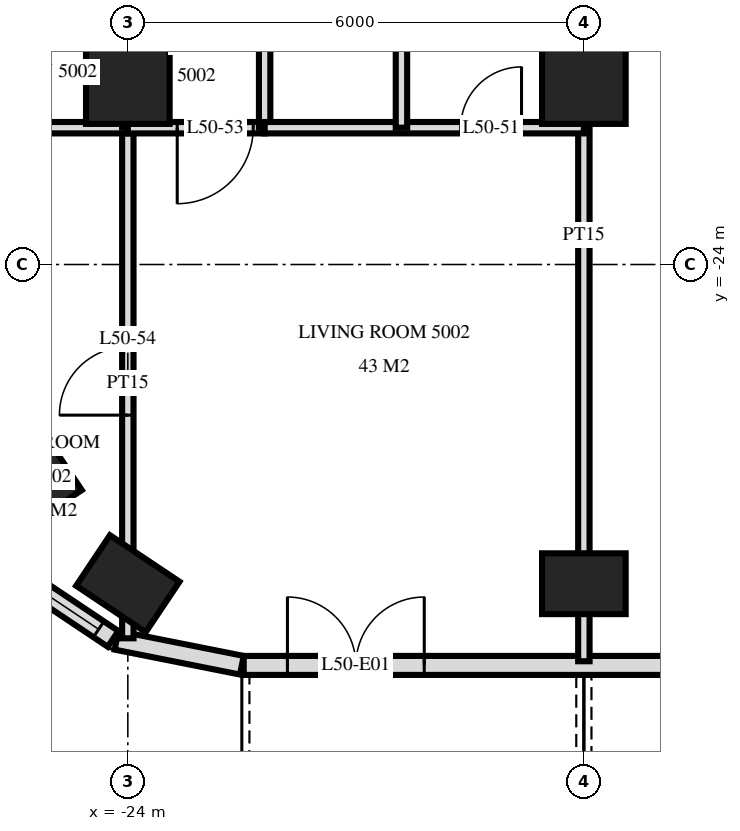
"""IFC4 building model, lengths in metres.
Left out: names, types, materials, properties, quantities, classifications, styles, units other than length and angle.
Written with IfcOpenShell. Run it as: python <this file> out.ifc"""

import sys

from ifc_helpers import new_model, si_unit, direction, frame, frame_2d, origin, origin_2d, place, context, subcontext, project, spatial, rectangle, extrude, element, fill, save


model = new_model("IFC4")
c1 = context("Model", 3, precision=1e-05, world=origin(), true_north=direction((0.0, 1.0)))
c2 = subcontext(c1, "Body", "Model", "MODEL_VIEW")
j1 = project(units=[si_unit("LENGTHUNIT", "METRE"), si_unit("PLANEANGLEUNIT", "RADIAN")], contexts=[c1])
p1 = place(None, origin())
s1 = spatial("IfcSite", under=j1, at=p1, CompositionType="ELEMENT")
p2 = place(p1, origin())
s2 = spatial("IfcBuilding", under=s1, at=p2, CompositionType="ELEMENT")
p3 = place(p2, frame((0.0, 0.0, 194.1)))
s3 = spatial("IfcBuildingStorey", under=s2, at=p3, CompositionType="ELEMENT", Elevation=194.1)
for number, where, z_axis, x_axis in (
    (1, (-25.244, -26.733, 0.0), (0.0, 0.0, 1.0), (-0.556, 0.831, 0.0)),
    (2, (-24.0, -28.2, 0.0), (0.0, 0.0, 1.0), (-0.831, 0.556, 0.0)),
):
    element("IfcColumn", number, at=place(p3, frame(where, z_axis=z_axis, x_axis=x_axis)), inside=s3, PredefinedType="COLUMN", context=c2, shape_type="SweptSolid", body=[
        extrude(rectangle(XDim=1.1, YDim=0.8, at=origin_2d()), origin(), (0.0, 0.0, 1.0), 3.5),
    ])
p4 = place(p3, frame((-24.0, -21.6, 0.0), z_axis=(0.0, 0.0, 1.0), x_axis=(1.0, 0.0, 0.0)))
e3 = element("IfcColumn", 3, at=p4, inside=s3, PredefinedType="COLUMN", context=c2, shape_type="SweptSolid", body=[
    extrude(rectangle(XDim=1.1, YDim=1.1, at=origin_2d()), origin(), (0.0, 0.0, 1.0), 3.5),
])
p5 = place(p3, frame((-18.0, -28.2, 0.0), z_axis=(0.0, 0.0, 1.0), x_axis=(1.0, 0.0, 0.0)))
e4 = element("IfcColumn", 4, at=p5, inside=s3, PredefinedType="COLUMN", context=c2, shape_type="SweptSolid", body=[
    extrude(rectangle(XDim=1.1, YDim=0.8, at=origin_2d()), origin(), (0.0, 0.0, 1.0), 3.5),
])
p6 = place(p3, frame((-18.0, -21.6, 0.0), z_axis=(0.0, 0.0, 1.0), x_axis=(1.0, 0.0, 0.0)))
e5 = element("IfcColumn", 5, at=p6, inside=s3, PredefinedType="COLUMN", context=c2, shape_type="SweptSolid", body=[
    extrude(rectangle(XDim=1.1, YDim=1.1, at=origin_2d()), origin(), (0.0, 0.0, 1.0), 3.5),
])
p7 = place(p3, frame((-25.571, -28.006, 0.0), z_axis=(0.0, 0.0, 1.0), x_axis=(0.831482937015, -0.55555029066, 0.0)))
e6 = element("IfcWall", 6, at=p7, inside=s3, PredefinedType="SOLIDWALL", context=c2, shape_type="SweptSolid", body=[
    extrude(rectangle(XDim=1.656, YDim=0.25, at=frame_2d((0.828, 0.0))), origin(), (0.0, 0.0, 1.0), 3.22),
])
p8 = place(p7, frame((0.228, 0.0, 0.9)))
e7 = element("IfcOpeningElement", 7, at=p8, cuts=e6, PredefinedType="OPENING", context=c2, shape_type="SweptSolid", body=[
    extrude(rectangle(XDim=1.2, YDim=1.5, at=frame_2d((0.6, 0.75))), frame((0.0, 0.135, 0.0), z_axis=(0.0, -1.0, 0.0), x_axis=(1.0, 0.0, 0.0)), (0.0, 0.0, 1.0), 0.27),
])
p9 = place(p3, frame((-24.149, -28.945, 0.0), z_axis=(0.0, 0.0, 1.0), x_axis=(0.980775640221, -0.19513878023, 0.0)))
e8 = element("IfcWall", 8, at=p9, inside=s3, PredefinedType="SOLIDWALL", context=c2, shape_type="SweptSolid", body=[
    extrude(rectangle(XDim=1.681, YDim=0.25, at=frame_2d((0.841, 0.0))), origin(), (0.0, 0.0, 1.0), 3.22),
])
p10 = place(p3, frame((-22.475, -29.275, 0.0), z_axis=(0.0, 0.0, 1.0), x_axis=(1.0, 0.0, 0.0)))
e9 = element("IfcWall", 9, at=p10, inside=s3, PredefinedType="SOLIDWALL", context=c2, shape_type="SweptSolid", body=[
    extrude(rectangle(XDim=44.951, YDim=0.25, at=frame_2d((22.475, 0.0))), origin(), (0.0, 0.0, 1.0), 3.22),
])
p11 = place(p10, frame((0.575, 0.0, 0.0)))
e10 = element("IfcOpeningElement", 10, at=p11, cuts=e9, PredefinedType="OPENING", context=c2, shape_type="SweptSolid", body=[
    extrude(rectangle(XDim=1.8, YDim=2.4, at=frame_2d((0.9, 1.2))), frame((0.0, 0.135, 0.0), z_axis=(0.0, -1.0, 0.0), x_axis=(1.0, 0.0, 0.0)), (0.0, 0.0, 1.0), 0.27),
])
p12 = place(p10, frame((6.575, 0.0, 0.0)))
e11 = element("IfcOpeningElement", 11, at=p12, cuts=e9, PredefinedType="OPENING", context=c2, shape_type="SweptSolid", body=[
    extrude(rectangle(XDim=1.8, YDim=2.4, at=frame_2d((0.9, 1.2))), frame((0.0, 0.135, 0.0), z_axis=(0.0, -1.0, 0.0), x_axis=(1.0, 0.0, 0.0)), (0.0, 0.0, 1.0), 0.27),
])
p13 = place(p10, frame((11.075, 0.0, 0.0)))
e12 = element("IfcOpeningElement", 12, at=p13, cuts=e9, PredefinedType="OPENING", context=c2, shape_type="SweptSolid", body=[
    extrude(rectangle(XDim=1.8, YDim=2.4, at=frame_2d((0.9, 1.2))), frame((0.0, 0.135, 0.0), z_axis=(0.0, -1.0, 0.0), x_axis=(1.0, 0.0, 0.0)), (0.0, 0.0, 1.0), 0.27),
])
p14 = place(p10, frame((13.775, 0.0, 0.9)))
e13 = element("IfcOpeningElement", 13, at=p14, cuts=e9, PredefinedType="OPENING", context=c2, shape_type="SweptSolid", body=[
    extrude(rectangle(XDim=2.4, YDim=1.5, at=frame_2d((1.2, 0.75))), frame((0.0, 0.135, 0.0), z_axis=(0.0, -1.0, 0.0), x_axis=(1.0, 0.0, 0.0)), (0.0, 0.0, 1.0), 0.27),
])
p15 = place(p10, frame((16.775, 0.0, 0.9)))
e14 = element("IfcOpeningElement", 14, at=p15, cuts=e9, PredefinedType="OPENING", context=c2, shape_type="SweptSolid", body=[
    extrude(rectangle(XDim=2.4, YDim=1.5, at=frame_2d((1.2, 0.75))), frame((0.0, 0.135, 0.0), z_axis=(0.0, -1.0, 0.0), x_axis=(1.0, 0.0, 0.0)), (0.0, 0.0, 1.0), 0.27),
])
p16 = place(p10, frame((20.075, 0.0, 0.0)))
e15 = element("IfcOpeningElement", 15, at=p16, cuts=e9, PredefinedType="OPENING", context=c2, shape_type="SweptSolid", body=[
    extrude(rectangle(XDim=1.8, YDim=2.4, at=frame_2d((0.9, 1.2))), frame((0.0, 0.135, 0.0), z_axis=(0.0, -1.0, 0.0), x_axis=(1.0, 0.0, 0.0)), (0.0, 0.0, 1.0), 0.27),
])
p17 = place(p10, frame((23.075, 0.0, 0.0)))
e16 = element("IfcOpeningElement", 16, at=p17, cuts=e9, PredefinedType="OPENING", context=c2, shape_type="SweptSolid", body=[
    extrude(rectangle(XDim=1.8, YDim=2.4, at=frame_2d((0.9, 1.2))), frame((0.0, 0.135, 0.0), z_axis=(0.0, -1.0, 0.0), x_axis=(1.0, 0.0, 0.0)), (0.0, 0.0, 1.0), 0.27),
])
p18 = place(p10, frame((25.775, 0.0, 0.9)))
e17 = element("IfcOpeningElement", 17, at=p18, cuts=e9, PredefinedType="OPENING", context=c2, shape_type="SweptSolid", body=[
    extrude(rectangle(XDim=2.4, YDim=1.5, at=frame_2d((1.2, 0.75))), frame((0.0, 0.135, 0.0), z_axis=(0.0, -1.0, 0.0), x_axis=(1.0, 0.0, 0.0)), (0.0, 0.0, 1.0), 0.27),
])
p19 = place(p10, frame((29.075, 0.0, 0.0)))
e18 = element("IfcOpeningElement", 18, at=p19, cuts=e9, PredefinedType="OPENING", context=c2, shape_type="SweptSolid", body=[
    extrude(rectangle(XDim=1.8, YDim=2.4, at=frame_2d((0.9, 1.2))), frame((0.0, 0.135, 0.0), z_axis=(0.0, -1.0, 0.0), x_axis=(1.0, 0.0, 0.0)), (0.0, 0.0, 1.0), 0.27),
])
p20 = place(p10, frame((31.775, 0.0, 0.9)))
e19 = element("IfcOpeningElement", 19, at=p20, cuts=e9, PredefinedType="OPENING", context=c2, shape_type="SweptSolid", body=[
    extrude(rectangle(XDim=2.4, YDim=1.5, at=frame_2d((1.2, 0.75))), frame((0.0, 0.135, 0.0), z_axis=(0.0, -1.0, 0.0), x_axis=(1.0, 0.0, 0.0)), (0.0, 0.0, 1.0), 0.27),
])
p21 = place(p10, frame((35.075, 0.0, 0.0)))
e20 = element("IfcOpeningElement", 20, at=p21, cuts=e9, PredefinedType="OPENING", context=c2, shape_type="SweptSolid", body=[
    extrude(rectangle(XDim=1.8, YDim=2.4, at=frame_2d((0.9, 1.2))), frame((0.0, 0.135, 0.0), z_axis=(0.0, -1.0, 0.0), x_axis=(1.0, 0.0, 0.0)), (0.0, 0.0, 1.0), 0.27),
])
p22 = place(p10, frame((37.775, 0.0, 0.9)))
e21 = element("IfcOpeningElement", 21, at=p22, cuts=e9, PredefinedType="OPENING", context=c2, shape_type="SweptSolid", body=[
    extrude(rectangle(XDim=2.4, YDim=1.5, at=frame_2d((1.2, 0.75))), frame((0.0, 0.135, 0.0), z_axis=(0.0, -1.0, 0.0), x_axis=(1.0, 0.0, 0.0)), (0.0, 0.0, 1.0), 0.27),
])
p23 = place(p10, frame((41.075, 0.0, 0.0)))
e22 = element("IfcOpeningElement", 22, at=p23, cuts=e9, PredefinedType="OPENING", context=c2, shape_type="SweptSolid", body=[
    extrude(rectangle(XDim=1.8, YDim=2.4, at=frame_2d((0.9, 1.2))), frame((0.0, 0.135, 0.0), z_axis=(0.0, -1.0, 0.0), x_axis=(1.0, 0.0, 0.0)), (0.0, 0.0, 1.0), 0.27),
])
p24 = place(p3, frame((-18.0, -29.22, 0.0), z_axis=(0.0, 0.0, 1.0), x_axis=(0.0, 1.0, 0.0)))
e23 = element("IfcWall", 23, at=p24, inside=s3, PredefinedType="PARTITIONING", context=c2, shape_type="SweptSolid", body=[
    extrude(rectangle(XDim=11.22, YDim=0.15, at=frame_2d((5.61, 0.0))), origin(), (0.0, 0.0, 1.0), 3.22),
])
for number, where, z_axis, x_axis in (
    (24, (-20.4, -22.2, 0.0), (0.0, 0.0, 1.0), (0.0, 1.0, 0.0)),
    (25, (-22.2, -22.2, 0.0), (0.0, 0.0, 1.0), (0.0, 1.0, 0.0)),
):
    element("IfcWall", number, at=place(p3, frame(where, z_axis=z_axis, x_axis=x_axis)), inside=s3, PredefinedType="PARTITIONING", context=c2, shape_type="SweptSolid", body=[
        extrude(rectangle(XDim=4.2, YDim=0.15, at=frame_2d((2.1, 0.0))), origin(), (0.0, 0.0, 1.0), 3.22),
    ])
p25 = place(p3, frame((-24.0, -22.2, 0.0), z_axis=(0.0, 0.0, 1.0), x_axis=(0.0, 1.0, 0.0)))
e26 = element("IfcWall", 26, at=p25, inside=s3, PredefinedType="PARTITIONING", context=c2, shape_type="SweptSolid", body=[
    extrude(rectangle(XDim=4.2, YDim=0.15, at=frame_2d((2.1, 0.0))), origin(), (0.0, 0.0, 1.0), 3.22),
])
p26 = place(p25, frame((1.58, 0.0, 0.0)))
e27 = element("IfcOpeningElement", 27, at=p26, cuts=e26, PredefinedType="OPENING", context=c2, shape_type="SweptSolid", body=[
    extrude(rectangle(XDim=1.0, YDim=2.1, at=frame_2d((0.5, 1.05))), frame((0.0, 0.085, 0.0), z_axis=(0.0, -1.0, 0.0), x_axis=(1.0, 0.0, 0.0)), (0.0, 0.0, 1.0), 0.17),
])
p27 = place(p3, frame((-24.0, -28.918, 0.0), z_axis=(0.0, 0.0, 1.0), x_axis=(0.0, 1.0, 0.0)))
e28 = element("IfcWall", 28, at=p27, inside=s3, PredefinedType="PARTITIONING", context=c2, shape_type="SweptSolid", body=[
    extrude(rectangle(XDim=6.718, YDim=0.15, at=frame_2d((3.359, 0.0))), origin(), (0.0, 0.0, 1.0), 3.22),
])
p28 = place(p27, frame((2.936, 0.0, 0.0)))
e29 = element("IfcOpeningElement", 29, at=p28, cuts=e28, PredefinedType="OPENING", context=c2, shape_type="SweptSolid", body=[
    extrude(rectangle(XDim=0.9, YDim=2.1, at=frame_2d((0.45, 1.05))), frame((0.0, 0.085, 0.0), z_axis=(0.0, -1.0, 0.0), x_axis=(1.0, 0.0, 0.0)), (0.0, 0.0, 1.0), 0.17),
])
p29 = place(p3, frame((-24.0, -22.2, 0.0), z_axis=(0.0, 0.0, 1.0), x_axis=(1.0, 0.0, 0.0)))
e30 = element("IfcWall", 30, at=p29, inside=s3, PredefinedType="PARTITIONING", context=c2, shape_type="SweptSolid", body=[
    extrude(rectangle(XDim=1.8, YDim=0.15, at=frame_2d((0.9, 0.0))), origin(), (0.0, 0.0, 1.0), 3.22),
])
p30 = place(p29, frame((0.65, 0.0, 0.0)))
e31 = element("IfcOpeningElement", 31, at=p30, cuts=e30, PredefinedType="OPENING", context=c2, shape_type="SweptSolid", body=[
    extrude(rectangle(XDim=1.0, YDim=2.1, at=frame_2d((0.5, 1.05))), frame((0.0, 0.085, 0.0), z_axis=(0.0, -1.0, 0.0), x_axis=(1.0, 0.0, 0.0)), (0.0, 0.0, 1.0), 0.17),
])
p31 = place(p3, frame((-26.82, -22.2, 0.0), z_axis=(0.0, 0.0, 1.0), x_axis=(1.0, 0.0, 0.0)))
e32 = element("IfcWall", 32, at=p31, inside=s3, PredefinedType="PARTITIONING", context=c2, shape_type="SweptSolid", body=[
    extrude(rectangle(XDim=2.82, YDim=0.15, at=frame_2d((1.41, 0.0))), origin(), (0.0, 0.0, 1.0), 3.22),
])
p32 = place(p3, frame((-22.2, -22.2, 0.0), z_axis=(0.0, 0.0, 1.0), x_axis=(1.0, 0.0, 0.0)))
e33 = element("IfcWall", 33, at=p32, inside=s3, PredefinedType="PARTITIONING", context=c2, shape_type="SweptSolid", body=[
    extrude(rectangle(XDim=4.2, YDim=0.15, at=frame_2d((2.1, 0.0))), origin(), (0.0, 0.0, 1.0), 3.22),
])
p33 = place(p32, frame((2.58, 0.0, 0.0)))
e34 = element("IfcOpeningElement", 34, at=p33, cuts=e33, PredefinedType="OPENING", context=c2, shape_type="SweptSolid", body=[
    extrude(rectangle(XDim=0.8, YDim=2.1, at=frame_2d((0.4, 1.05))), frame((0.0, 0.085, 0.0), z_axis=(0.0, -1.0, 0.0), x_axis=(1.0, 0.0, 0.0)), (0.0, 0.0, 1.0), 0.17),
])
p34 = place(p8, origin())
e35 = element("IfcWindow", 35, at=p34, inside=s3, PartitioningType="SINGLE_PANEL", PredefinedType="WINDOW", context=c2, shape_type="SweptSolid", body=[
    extrude(rectangle(XDim=1.2, YDim=1.5, at=frame_2d((0.6, 0.75))), frame((0.0, 0.03, 0.0), z_axis=(0.0, -1.0, 0.0), x_axis=(1.0, 0.0, 0.0)), (0.0, 0.0, 1.0), 0.06),
])
fill(e7, e35)
p35 = place(p11, origin())
e36 = element("IfcDoor", 36, at=p35, inside=s3, OperationType="DOUBLE_DOOR_SINGLE_SWING", PredefinedType="DOOR", context=c2, shape_type="SweptSolid", body=[
    extrude(rectangle(XDim=1.8, YDim=2.4, at=frame_2d((0.9, 1.2))), frame((0.0, 0.025, 0.0), z_axis=(0.0, -1.0, 0.0), x_axis=(1.0, 0.0, 0.0)), (0.0, 0.0, 1.0), 0.05),
])
fill(e10, e36)
p36 = place(p33, origin())
e37 = element("IfcDoor", 37, at=p36, inside=s3, OperationType="SINGLE_SWING_LEFT", PredefinedType="DOOR", context=c2, shape_type="SweptSolid", body=[
    extrude(rectangle(XDim=0.8, YDim=2.1, at=frame_2d((0.4, 1.05))), frame((0.0, 0.025, 0.0), z_axis=(0.0, -1.0, 0.0), x_axis=(1.0, 0.0, 0.0)), (0.0, 0.0, 1.0), 0.05),
])
fill(e34, e37)
p37 = place(p30, frame((0.5, 0.0, 0.0), z_axis=(0.0, 0.0, 1.0), x_axis=(-1.0, 0.0, 0.0)))
e38 = element("IfcDoor", 38, at=p37, inside=s3, OperationType="SINGLE_SWING_LEFT", PredefinedType="DOOR", context=c2, shape_type="SweptSolid", body=[
    extrude(rectangle(XDim=1.0, YDim=2.1, at=frame_2d((0.0, 1.05))), frame((0.0, -0.025, 0.0), z_axis=(0.0, 1.0, 0.0), x_axis=(-1.0, 0.0, 0.0)), (0.0, 0.0, 1.0), 0.05),
])
fill(e31, e38)
p38 = place(p28, origin())
e39 = element("IfcDoor", 39, at=p38, inside=s3, OperationType="SINGLE_SWING_RIGHT", PredefinedType="DOOR", context=c2, shape_type="SweptSolid", body=[
    extrude(rectangle(XDim=0.9, YDim=2.1, at=frame_2d((0.45, 1.05))), frame((0.0, 0.025, 0.0), z_axis=(0.0, -1.0, 0.0), x_axis=(1.0, 0.0, 0.0)), (0.0, 0.0, 1.0), 0.05),
])
fill(e29, e39)
save(model, sys.argv[1])
